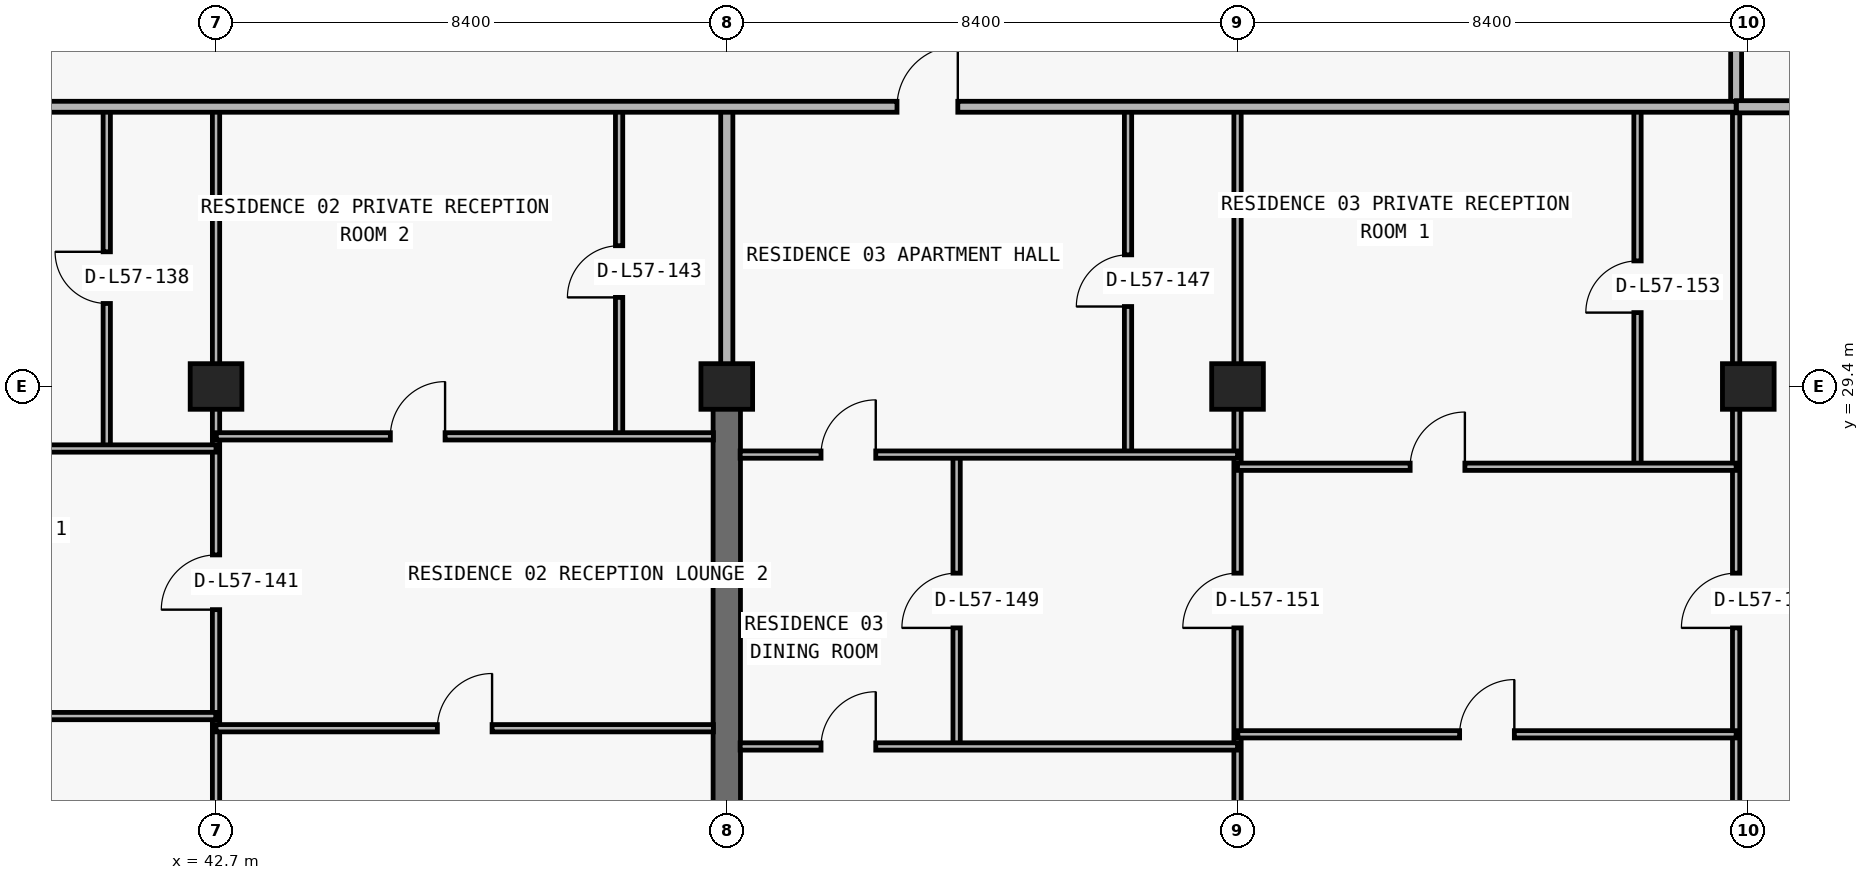
"""IFC4 building model, lengths in metres.
Left out: names, types, materials, properties, quantities, classifications, styles, units other than length and angle.
Written with IfcOpenShell. Run it as: python <this file> out.ifc"""

import sys

from ifc_helpers import new_model, si_unit, direction, frame, frame_2d, origin, origin_2d, place, context, subcontext, project, spatial, rectangle, extrude, element, fill, save


model = new_model("IFC4")
c1 = context("Model", 3, precision=1e-05, world=origin(), true_north=direction((0.0, 1.0)))
c2 = subcontext(c1, "Body", "Model", "MODEL_VIEW")
j1 = project(units=[si_unit("LENGTHUNIT", "METRE"), si_unit("PLANEANGLEUNIT", "RADIAN")], contexts=[c1])
p1 = place(None, origin())
s1 = spatial("IfcSite", under=j1, at=p1, CompositionType="ELEMENT")
p2 = place(p1, origin())
s2 = spatial("IfcBuilding", under=s1, at=p2, CompositionType="ELEMENT")
p3 = place(p2, frame((0.0, 0.0, 204.9)))
s3 = spatial("IfcBuildingStorey", under=s2, at=p3, CompositionType="ELEMENT", Elevation=204.9)
for number, where, z_axis, x_axis in (
    (1, (42.7, 29.4, 0.0), (0.0, 0.0, 1.0), (1.0, 0.0, 0.0)),
    (2, (51.1, 29.4, 0.0), (0.0, 0.0, 1.0), (1.0, 0.0, 0.0)),
    (3, (59.5, 29.4, 0.0), (0.0, 0.0, 1.0), (1.0, 0.0, 0.0)),
    (4, (67.9, 29.4, 0.0), (0.0, 0.0, 1.0), (1.0, 0.0, 0.0)),
):
    element("IfcColumn", number, at=place(p3, frame(where, z_axis=z_axis, x_axis=x_axis)), inside=s3, PredefinedType="COLUMN", context=c2, shape_type="SweptSolid", body=[
        extrude(rectangle(XDim=0.85, YDim=0.75, at=origin_2d()), origin(), (0.0, 0.0, 1.0), 3.05),
    ])
p4 = place(p3, frame((51.1, 20.8, 0.0), z_axis=(0.0, 0.0, 1.0), x_axis=(0.0, 1.0, 0.0)))
e5 = element("IfcWall", 5, at=p4, inside=s3, PredefinedType="SHEAR", context=c2, shape_type="SweptSolid", body=[
    extrude(rectangle(XDim=8.6, YDim=0.45, at=frame_2d((4.3, 0.0))), origin(), (0.0, 0.0, 1.0), 3.05),
])
p5 = place(p3, frame((40.903, 28.38, 0.0), z_axis=(0.0, 0.0, 1.0), x_axis=(0.0, 1.0, 0.0)))
e6 = element("IfcWall", 6, at=p5, inside=s3, PredefinedType="PARTITIONING", context=c2, shape_type="SweptSolid", body=[
    extrude(rectangle(XDim=5.62, YDim=0.12, at=frame_2d((2.81, 0.0))), origin(), (0.0, 0.0, 1.0), 2.725),
])
p6 = place(p5, frame((2.385, 0.0, 0.0)))
e7 = element("IfcOpeningElement", 7, at=p6, cuts=e6, PredefinedType="OPENING", context=c2, shape_type="SweptSolid", body=[
    extrude(rectangle(XDim=0.85, YDim=2.1, at=frame_2d((0.425, 1.05))), frame((0.0, 0.07, 0.0), z_axis=(0.0, -1.0, 0.0), x_axis=(1.0, 0.0, 0.0)), (0.0, 0.0, 1.0), 0.14),
])
p7 = place(p3, frame((42.7, 11.24, 0.0), z_axis=(0.0, 0.0, 1.0), x_axis=(0.0, 1.0, 0.0)))
e8 = element("IfcWall", 8, at=p7, inside=s3, PredefinedType="PARTITIONING", context=c2, shape_type="SweptSolid", body=[
    extrude(rectangle(XDim=22.76, YDim=0.12, at=frame_2d((11.38, 0.0))), origin(), (0.0, 0.0, 1.0), 2.263),
])
p8 = place(p7, frame((14.49, 0.0, 0.0)))
e9 = element("IfcOpeningElement", 9, at=p8, cuts=e8, PredefinedType="OPENING", context=c2, shape_type="SweptSolid", body=[
    extrude(rectangle(XDim=0.9, YDim=2.15, at=frame_2d((0.45, 1.075))), frame((0.0, 0.07, 0.0), z_axis=(0.0, -1.0, 0.0), x_axis=(1.0, 0.0, 0.0)), (0.0, 0.0, 1.0), 0.14),
])
p9 = place(p3, frame((49.329, 28.58, 0.0), z_axis=(0.0, 0.0, 1.0), x_axis=(0.0, 1.0, 0.0)))
e10 = element("IfcWall", 10, at=p9, inside=s3, PredefinedType="PARTITIONING", context=c2, shape_type="SweptSolid", body=[
    extrude(rectangle(XDim=5.42, YDim=0.12, at=frame_2d((2.71, 0.0))), origin(), (0.0, 0.0, 1.0), 3.05),
])
p10 = place(p9, frame((2.285, 0.0, 0.0)))
e11 = element("IfcOpeningElement", 11, at=p10, cuts=e10, PredefinedType="OPENING", context=c2, shape_type="SweptSolid", body=[
    extrude(rectangle(XDim=0.85, YDim=2.1, at=frame_2d((0.425, 1.05))), frame((0.0, 0.07, 0.0), z_axis=(0.0, -1.0, 0.0), x_axis=(1.0, 0.0, 0.0)), (0.0, 0.0, 1.0), 0.14),
])
p11 = place(p3, frame((51.1, 29.405, 0.0), z_axis=(0.0, 0.0, 1.0), x_axis=(0.0, 1.0, 0.0)))
e12 = element("IfcWall", 12, at=p11, inside=s3, PredefinedType="PARTITIONING", context=c2, shape_type="SweptSolid", body=[
    extrude(rectangle(XDim=4.595, YDim=0.2, at=frame_2d((2.297, 0.0))), origin(), (0.0, 0.0, 1.0), 2.335),
])
p12 = place(p3, frame((54.88, 23.48, 0.0), z_axis=(0.0, 0.0, 1.0), x_axis=(0.0, 1.0, 0.0)))
e13 = element("IfcWall", 13, at=p12, inside=s3, PredefinedType="PARTITIONING", context=c2, shape_type="SweptSolid", body=[
    extrude(rectangle(XDim=4.8, YDim=0.12, at=frame_2d((2.4, 0.0))), origin(), (0.0, 0.0, 1.0), 3.05),
])
p13 = place(p12, frame((1.95, 0.0, 0.0)))
e14 = element("IfcOpeningElement", 14, at=p13, cuts=e13, PredefinedType="OPENING", context=c2, shape_type="SweptSolid", body=[
    extrude(rectangle(XDim=0.9, YDim=2.15, at=frame_2d((0.45, 1.075))), frame((0.0, 0.07, 0.0), z_axis=(0.0, -1.0, 0.0), x_axis=(1.0, 0.0, 0.0)), (0.0, 0.0, 1.0), 0.14),
])
p14 = place(p3, frame((57.699, 28.28, 0.0), z_axis=(0.0, 0.0, 1.0), x_axis=(0.0, 1.0, 0.0)))
e15 = element("IfcWall", 15, at=p14, inside=s3, PredefinedType="PARTITIONING", context=c2, shape_type="SweptSolid", body=[
    extrude(rectangle(XDim=5.72, YDim=0.12, at=frame_2d((2.86, 0.0))), origin(), (0.0, 0.0, 1.0), 2.725),
])
p15 = place(p14, frame((2.435, 0.0, 0.0)))
e16 = element("IfcOpeningElement", 16, at=p15, cuts=e15, PredefinedType="OPENING", context=c2, shape_type="SweptSolid", body=[
    extrude(rectangle(XDim=0.85, YDim=2.1, at=frame_2d((0.425, 1.05))), frame((0.0, 0.07, 0.0), z_axis=(0.0, -1.0, 0.0), x_axis=(1.0, 0.0, 0.0)), (0.0, 0.0, 1.0), 0.14),
])
p16 = place(p3, frame((59.5, 11.24, 0.0), z_axis=(0.0, 0.0, 1.0), x_axis=(0.0, 1.0, 0.0)))
e17 = element("IfcWall", 17, at=p16, inside=s3, PredefinedType="PARTITIONING", context=c2, shape_type="SweptSolid", body=[
    extrude(rectangle(XDim=22.76, YDim=0.12, at=frame_2d((11.38, 0.0))), origin(), (0.0, 0.0, 1.0), 2.263),
])
p17 = place(p16, frame((14.19, 0.0, 0.0)))
e18 = element("IfcOpeningElement", 18, at=p17, cuts=e17, PredefinedType="OPENING", context=c2, shape_type="SweptSolid", body=[
    extrude(rectangle(XDim=0.9, YDim=2.15, at=frame_2d((0.45, 1.075))), frame((0.0, 0.07, 0.0), z_axis=(0.0, -1.0, 0.0), x_axis=(1.0, 0.0, 0.0)), (0.0, 0.0, 1.0), 0.14),
])
p18 = place(p3, frame((66.078, 28.08, 0.0), z_axis=(0.0, 0.0, 1.0), x_axis=(0.0, 1.0, 0.0)))
e19 = element("IfcWall", 19, at=p18, inside=s3, PredefinedType="PARTITIONING", context=c2, shape_type="SweptSolid", body=[
    extrude(rectangle(XDim=5.92, YDim=0.12, at=frame_2d((2.96, 0.0))), origin(), (0.0, 0.0, 1.0), 2.725),
])
p19 = place(p18, frame((2.535, 0.0, 0.0)))
e20 = element("IfcOpeningElement", 20, at=p19, cuts=e19, PredefinedType="OPENING", context=c2, shape_type="SweptSolid", body=[
    extrude(rectangle(XDim=0.85, YDim=2.1, at=frame_2d((0.425, 1.05))), frame((0.0, 0.07, 0.0), z_axis=(0.0, -1.0, 0.0), x_axis=(1.0, 0.0, 0.0)), (0.0, 0.0, 1.0), 0.14),
])
p20 = place(p3, frame((67.7, 11.32, 0.0), z_axis=(0.0, 0.0, 1.0), x_axis=(0.0, 1.0, 0.0)))
e21 = element("IfcWall", 21, at=p20, inside=s3, PredefinedType="PARTITIONING", context=c2, shape_type="SweptSolid", body=[
    extrude(rectangle(XDim=22.68, YDim=0.12, at=frame_2d((11.34, 0.0))), origin(), (0.0, 0.0, 1.0), 2.263),
])
p21 = place(p20, frame((14.11, 0.0, 0.0)))
e22 = element("IfcOpeningElement", 22, at=p21, cuts=e21, PredefinedType="OPENING", context=c2, shape_type="SweptSolid", body=[
    extrude(rectangle(XDim=0.9, YDim=2.15, at=frame_2d((0.45, 1.075))), frame((0.0, 0.07, 0.0), z_axis=(0.0, -1.0, 0.0), x_axis=(1.0, 0.0, 0.0)), (0.0, 0.0, 1.0), 0.14),
])
p22 = place(p3, frame((67.7, 34.005, 0.0), z_axis=(0.0, 0.0, 1.0), x_axis=(0.0, 1.0, 0.0)))
e23 = element("IfcWall", 23, at=p22, inside=s3, PredefinedType="PARTITIONING", context=c2, shape_type="SweptSolid", body=[
    extrude(rectangle(XDim=2.995, YDim=0.18, at=frame_2d((1.498, 0.0))), origin(), (0.0, 0.0, 1.0), 2.263),
])
p23 = place(p3, frame((51.32, 23.48, 0.0), z_axis=(0.0, 0.0, 1.0), x_axis=(1.0, 0.0, 0.0)))
e24 = element("IfcWall", 24, at=p23, inside=s3, PredefinedType="PARTITIONING", context=c2, shape_type="SweptSolid", body=[
    extrude(rectangle(XDim=8.18, YDim=0.12, at=frame_2d((4.09, 0.0))), origin(), (0.0, 0.0, 1.0), 3.05),
])
p24 = place(p23, frame((1.33, 0.0, 0.0)))
e25 = element("IfcOpeningElement", 25, at=p24, cuts=e24, PredefinedType="OPENING", context=c2, shape_type="SweptSolid", body=[
    extrude(rectangle(XDim=0.9, YDim=2.15, at=frame_2d((0.45, 1.075))), frame((0.0, 0.07, 0.0), z_axis=(0.0, -1.0, 0.0), x_axis=(1.0, 0.0, 0.0)), (0.0, 0.0, 1.0), 0.14),
])
p25 = place(p3, frame((59.505, 23.68, 0.0), z_axis=(0.0, 0.0, 1.0), x_axis=(1.0, 0.0, 0.0)))
e26 = element("IfcWall", 26, at=p25, inside=s3, PredefinedType="PARTITIONING", context=c2, shape_type="SweptSolid", body=[
    extrude(rectangle(XDim=8.195, YDim=0.12, at=frame_2d((4.098, 0.0))), origin(), (0.0, 0.0, 1.0), 3.05),
])
p26 = place(p25, frame((3.647, 0.0, 0.0)))
e27 = element("IfcOpeningElement", 27, at=p26, cuts=e26, PredefinedType="OPENING", context=c2, shape_type="SweptSolid", body=[
    extrude(rectangle(XDim=0.9, YDim=2.15, at=frame_2d((0.45, 1.075))), frame((0.0, 0.07, 0.0), z_axis=(0.0, -1.0, 0.0), x_axis=(1.0, 0.0, 0.0)), (0.0, 0.0, 1.0), 0.14),
])
p27 = place(p3, frame((42.7, 23.78, 0.0), z_axis=(0.0, 0.0, 1.0), x_axis=(1.0, 0.0, 0.0)))
e28 = element("IfcWall", 28, at=p27, inside=s3, PredefinedType="PARTITIONING", context=c2, shape_type="SweptSolid", body=[
    extrude(rectangle(XDim=8.18, YDim=0.12, at=frame_2d((4.09, 0.0))), origin(), (0.0, 0.0, 1.0), 3.05),
])
p28 = place(p27, frame((3.64, 0.0, 0.0)))
e29 = element("IfcOpeningElement", 29, at=p28, cuts=e28, PredefinedType="OPENING", context=c2, shape_type="SweptSolid", body=[
    extrude(rectangle(XDim=0.9, YDim=2.15, at=frame_2d((0.45, 1.075))), frame((0.0, 0.07, 0.0), z_axis=(0.0, -1.0, 0.0), x_axis=(1.0, 0.0, 0.0)), (0.0, 0.0, 1.0), 0.14),
])
p29 = place(p3, frame((35.105, 23.98, 0.0), z_axis=(0.0, 0.0, 1.0), x_axis=(1.0, 0.0, 0.0)))
e30 = element("IfcWall", 30, at=p29, inside=s3, PredefinedType="PARTITIONING", context=c2, shape_type="SweptSolid", body=[
    extrude(rectangle(XDim=7.59, YDim=0.12, at=frame_2d((3.795, 0.0))), origin(), (0.0, 0.0, 1.0), 3.05),
])
p30 = place(p29, frame((3.345, 0.0, 0.0)))
e31 = element("IfcOpeningElement", 31, at=p30, cuts=e30, PredefinedType="OPENING", context=c2, shape_type="SweptSolid", body=[
    extrude(rectangle(XDim=0.9, YDim=2.15, at=frame_2d((0.45, 1.075))), frame((0.0, 0.07, 0.0), z_axis=(0.0, -1.0, 0.0), x_axis=(1.0, 0.0, 0.0)), (0.0, 0.0, 1.0), 0.14),
])
p31 = place(p3, frame((59.5, 28.08, 0.0), z_axis=(0.0, 0.0, 1.0), x_axis=(1.0, 0.0, 0.0)))
e32 = element("IfcWall", 32, at=p31, inside=s3, PredefinedType="PARTITIONING", context=c2, shape_type="SweptSolid", body=[
    extrude(rectangle(XDim=8.2, YDim=0.12, at=frame_2d((4.1, 0.0))), origin(), (0.0, 0.0, 1.0), 3.05),
])
p32 = place(p31, frame((2.839, 0.0, 0.0)))
e33 = element("IfcOpeningElement", 33, at=p32, cuts=e32, PredefinedType="OPENING", context=c2, shape_type="SweptSolid", body=[
    extrude(rectangle(XDim=0.9, YDim=2.15, at=frame_2d((0.45, 1.075))), frame((0.0, 0.07, 0.0), z_axis=(0.0, -1.0, 0.0), x_axis=(1.0, 0.0, 0.0)), (0.0, 0.0, 1.0), 0.14),
])
p33 = place(p3, frame((51.32, 28.28, 0.0), z_axis=(0.0, 0.0, 1.0), x_axis=(1.0, 0.0, 0.0)))
e34 = element("IfcWall", 34, at=p33, inside=s3, PredefinedType="PARTITIONING", context=c2, shape_type="SweptSolid", body=[
    extrude(rectangle(XDim=8.18, YDim=0.12, at=frame_2d((4.09, 0.0))), origin(), (0.0, 0.0, 1.0), 3.05),
])
p34 = place(p33, frame((1.33, 0.0, 0.0)))
e35 = element("IfcOpeningElement", 35, at=p34, cuts=e34, PredefinedType="OPENING", context=c2, shape_type="SweptSolid", body=[
    extrude(rectangle(XDim=0.9, YDim=2.15, at=frame_2d((0.45, 1.075))), frame((0.0, 0.07, 0.0), z_axis=(0.0, -1.0, 0.0), x_axis=(1.0, 0.0, 0.0)), (0.0, 0.0, 1.0), 0.14),
])
p35 = place(p3, frame((35.1, 28.38, 0.0), z_axis=(0.0, 0.0, 1.0), x_axis=(1.0, 0.0, 0.0)))
e36 = element("IfcWall", 36, at=p35, inside=s3, PredefinedType="PARTITIONING", context=c2, shape_type="SweptSolid", body=[
    extrude(rectangle(XDim=7.6, YDim=0.12, at=frame_2d((3.8, 0.0))), origin(), (0.0, 0.0, 1.0), 3.05),
])
p36 = place(p35, frame((2.451, 0.0, 0.0)))
e37 = element("IfcOpeningElement", 37, at=p36, cuts=e36, PredefinedType="OPENING", context=c2, shape_type="SweptSolid", body=[
    extrude(rectangle(XDim=0.9, YDim=2.15, at=frame_2d((0.45, 1.075))), frame((0.0, 0.07, 0.0), z_axis=(0.0, -1.0, 0.0), x_axis=(1.0, 0.0, 0.0)), (0.0, 0.0, 1.0), 0.14),
])
p37 = place(p3, frame((42.705, 28.58, 0.0), z_axis=(0.0, 0.0, 1.0), x_axis=(1.0, 0.0, 0.0)))
e38 = element("IfcWall", 38, at=p37, inside=s3, PredefinedType="PARTITIONING", context=c2, shape_type="SweptSolid", body=[
    extrude(rectangle(XDim=8.175, YDim=0.12, at=frame_2d((4.087, 0.0))), origin(), (0.0, 0.0, 1.0), 3.05),
])
p38 = place(p37, frame((2.862, 0.0, 0.0)))
e39 = element("IfcOpeningElement", 39, at=p38, cuts=e38, PredefinedType="OPENING", context=c2, shape_type="SweptSolid", body=[
    extrude(rectangle(XDim=0.9, YDim=2.15, at=frame_2d((0.45, 1.075))), frame((0.0, 0.07, 0.0), z_axis=(0.0, -1.0, 0.0), x_axis=(1.0, 0.0, 0.0)), (0.0, 0.0, 1.0), 0.14),
])
p39 = place(p3, frame((10.105, 34.0, 0.0), z_axis=(0.0, 0.0, 1.0), x_axis=(1.0, 0.0, 0.0)))
e40 = element("IfcWall", 40, at=p39, inside=s3, PredefinedType="PARTITIONING", context=c2, shape_type="SweptSolid", body=[
    extrude(rectangle(XDim=57.595, YDim=0.18, at=frame_2d((28.797, 0.0))), origin(), (0.0, 0.0, 1.0), 3.05),
])
p40 = place(p39, frame((2.712, 0.0, 0.0)))
e41 = element("IfcOpeningElement", 41, at=p40, cuts=e40, PredefinedType="OPENING", context=c2, shape_type="SweptSolid", body=[
    extrude(rectangle(XDim=1.0, YDim=2.2, at=frame_2d((0.5, 1.1))), frame((0.0, 0.1, 0.0), z_axis=(0.0, -1.0, 0.0), x_axis=(1.0, 0.0, 0.0)), (0.0, 0.0, 1.0), 0.2),
])
p41 = place(p39, frame((19.391, 0.0, 0.0)))
e42 = element("IfcOpeningElement", 42, at=p41, cuts=e40, PredefinedType="OPENING", context=c2, shape_type="SweptSolid", body=[
    extrude(rectangle(XDim=1.0, YDim=2.2, at=frame_2d((0.5, 1.1))), frame((0.0, 0.1, 0.0), z_axis=(0.0, -1.0, 0.0), x_axis=(1.0, 0.0, 0.0)), (0.0, 0.0, 1.0), 0.2),
])
p42 = place(p39, frame((43.794, 0.0, 0.0)))
e43 = element("IfcOpeningElement", 43, at=p42, cuts=e40, PredefinedType="OPENING", context=c2, shape_type="SweptSolid", body=[
    extrude(rectangle(XDim=1.0, YDim=2.2, at=frame_2d((0.5, 1.1))), frame((0.0, 0.1, 0.0), z_axis=(0.0, -1.0, 0.0), x_axis=(1.0, 0.0, 0.0)), (0.0, 0.0, 1.0), 0.2),
])
p43 = place(p3, frame((67.705, 34.0, 0.0), z_axis=(0.0, 0.0, 1.0), x_axis=(1.0, 0.0, 0.0)))
e44 = element("IfcWall", 44, at=p43, inside=s3, PredefinedType="PARTITIONING", context=c2, shape_type="SweptSolid", body=[
    extrude(rectangle(XDim=3.7, YDim=0.2, at=frame_2d((1.85, 0.0))), origin(), (0.0, 0.0, 1.0), 3.05),
])
p44 = place(p6, origin())
e45 = element("IfcDoor", 45, at=p44, inside=s3, OperationType="SINGLE_SWING_RIGHT", PredefinedType="DOOR", context=c2, shape_type="SweptSolid", body=[
    extrude(rectangle(XDim=0.85, YDim=2.1, at=frame_2d((0.425, 1.05))), frame((0.0, 0.025, 0.0), z_axis=(0.0, -1.0, 0.0), x_axis=(1.0, 0.0, 0.0)), (0.0, 0.0, 1.0), 0.05),
])
fill(e7, e45)
p45 = place(p8, origin())
e46 = element("IfcDoor", 46, at=p45, inside=s3, OperationType="SINGLE_SWING_LEFT", PredefinedType="DOOR", context=c2, shape_type="SweptSolid", body=[
    extrude(rectangle(XDim=0.9, YDim=2.15, at=frame_2d((0.45, 1.075))), frame((0.0, 0.025, 0.0), z_axis=(0.0, -1.0, 0.0), x_axis=(1.0, 0.0, 0.0)), (0.0, 0.0, 1.0), 0.05),
])
fill(e9, e46)
p46 = place(p38, origin())
e47 = element("IfcDoor", 47, at=p46, inside=s3, OperationType="SINGLE_SWING_RIGHT", PredefinedType="DOOR", context=c2, shape_type="SweptSolid", body=[
    extrude(rectangle(XDim=0.9, YDim=2.15, at=frame_2d((0.45, 1.075))), frame((0.0, 0.025, 0.0), z_axis=(0.0, -1.0, 0.0), x_axis=(1.0, 0.0, 0.0)), (0.0, 0.0, 1.0), 0.05),
])
fill(e39, e47)
p47 = place(p10, origin())
e48 = element("IfcDoor", 48, at=p47, inside=s3, OperationType="SINGLE_SWING_LEFT", PredefinedType="DOOR", context=c2, shape_type="SweptSolid", body=[
    extrude(rectangle(XDim=0.85, YDim=2.1, at=frame_2d((0.425, 1.05))), frame((0.0, 0.025, 0.0), z_axis=(0.0, -1.0, 0.0), x_axis=(1.0, 0.0, 0.0)), (0.0, 0.0, 1.0), 0.05),
])
fill(e11, e48)
p48 = place(p28, origin())
e49 = element("IfcDoor", 49, at=p48, inside=s3, OperationType="SINGLE_SWING_RIGHT", PredefinedType="DOOR", context=c2, shape_type="SweptSolid", body=[
    extrude(rectangle(XDim=0.9, YDim=2.15, at=frame_2d((0.45, 1.075))), frame((0.0, 0.025, 0.0), z_axis=(0.0, -1.0, 0.0), x_axis=(1.0, 0.0, 0.0)), (0.0, 0.0, 1.0), 0.05),
])
fill(e29, e49)
p49 = place(p42, origin())
e50 = element("IfcDoor", 50, at=p49, inside=s3, OperationType="SINGLE_SWING_RIGHT", PredefinedType="DOOR", context=c2, shape_type="SweptSolid", body=[
    extrude(rectangle(XDim=1.0, YDim=2.2, at=frame_2d((0.5, 1.1))), frame((0.0, 0.025, 0.0), z_axis=(0.0, -1.0, 0.0), x_axis=(1.0, 0.0, 0.0)), (0.0, 0.0, 1.0), 0.05),
])
fill(e43, e50)
p50 = place(p15, origin())
e51 = element("IfcDoor", 51, at=p50, inside=s3, OperationType="SINGLE_SWING_LEFT", PredefinedType="DOOR", context=c2, shape_type="SweptSolid", body=[
    extrude(rectangle(XDim=0.85, YDim=2.1, at=frame_2d((0.425, 1.05))), frame((0.0, 0.025, 0.0), z_axis=(0.0, -1.0, 0.0), x_axis=(1.0, 0.0, 0.0)), (0.0, 0.0, 1.0), 0.05),
])
fill(e16, e51)
p51 = place(p34, origin())
e52 = element("IfcDoor", 52, at=p51, inside=s3, OperationType="SINGLE_SWING_RIGHT", PredefinedType="DOOR", context=c2, shape_type="SweptSolid", body=[
    extrude(rectangle(XDim=0.9, YDim=2.15, at=frame_2d((0.45, 1.075))), frame((0.0, 0.025, 0.0), z_axis=(0.0, -1.0, 0.0), x_axis=(1.0, 0.0, 0.0)), (0.0, 0.0, 1.0), 0.05),
])
fill(e35, e52)
p52 = place(p13, origin())
e53 = element("IfcDoor", 53, at=p52, inside=s3, OperationType="SINGLE_SWING_LEFT", PredefinedType="DOOR", context=c2, shape_type="SweptSolid", body=[
    extrude(rectangle(XDim=0.9, YDim=2.15, at=frame_2d((0.45, 1.075))), frame((0.0, 0.025, 0.0), z_axis=(0.0, -1.0, 0.0), x_axis=(1.0, 0.0, 0.0)), (0.0, 0.0, 1.0), 0.05),
])
fill(e14, e53)
p53 = place(p24, origin())
e54 = element("IfcDoor", 54, at=p53, inside=s3, OperationType="SINGLE_SWING_RIGHT", PredefinedType="DOOR", context=c2, shape_type="SweptSolid", body=[
    extrude(rectangle(XDim=0.9, YDim=2.15, at=frame_2d((0.45, 1.075))), frame((0.0, 0.025, 0.0), z_axis=(0.0, -1.0, 0.0), x_axis=(1.0, 0.0, 0.0)), (0.0, 0.0, 1.0), 0.05),
])
fill(e25, e54)
p54 = place(p17, origin())
e55 = element("IfcDoor", 55, at=p54, inside=s3, OperationType="SINGLE_SWING_LEFT", PredefinedType="DOOR", context=c2, shape_type="SweptSolid", body=[
    extrude(rectangle(XDim=0.9, YDim=2.15, at=frame_2d((0.45, 1.075))), frame((0.0, 0.025, 0.0), z_axis=(0.0, -1.0, 0.0), x_axis=(1.0, 0.0, 0.0)), (0.0, 0.0, 1.0), 0.05),
])
fill(e18, e55)
p55 = place(p32, origin())
e56 = element("IfcDoor", 56, at=p55, inside=s3, OperationType="SINGLE_SWING_RIGHT", PredefinedType="DOOR", context=c2, shape_type="SweptSolid", body=[
    extrude(rectangle(XDim=0.9, YDim=2.15, at=frame_2d((0.45, 1.075))), frame((0.0, 0.025, 0.0), z_axis=(0.0, -1.0, 0.0), x_axis=(1.0, 0.0, 0.0)), (0.0, 0.0, 1.0), 0.05),
])
fill(e33, e56)
p56 = place(p19, origin())
e57 = element("IfcDoor", 57, at=p56, inside=s3, OperationType="SINGLE_SWING_LEFT", PredefinedType="DOOR", context=c2, shape_type="SweptSolid", body=[
    extrude(rectangle(XDim=0.85, YDim=2.1, at=frame_2d((0.425, 1.05))), frame((0.0, 0.025, 0.0), z_axis=(0.0, -1.0, 0.0), x_axis=(1.0, 0.0, 0.0)), (0.0, 0.0, 1.0), 0.05),
])
fill(e20, e57)
p57 = place(p26, origin())
e58 = element("IfcDoor", 58, at=p57, inside=s3, OperationType="SINGLE_SWING_RIGHT", PredefinedType="DOOR", context=c2, shape_type="SweptSolid", body=[
    extrude(rectangle(XDim=0.9, YDim=2.15, at=frame_2d((0.45, 1.075))), frame((0.0, 0.025, 0.0), z_axis=(0.0, -1.0, 0.0), x_axis=(1.0, 0.0, 0.0)), (0.0, 0.0, 1.0), 0.05),
])
fill(e27, e58)
p58 = place(p21, origin())
e59 = element("IfcDoor", 59, at=p58, inside=s3, OperationType="SINGLE_SWING_LEFT", PredefinedType="DOOR", context=c2, shape_type="SweptSolid", body=[
    extrude(rectangle(XDim=0.9, YDim=2.15, at=frame_2d((0.45, 1.075))), frame((0.0, 0.025, 0.0), z_axis=(0.0, -1.0, 0.0), x_axis=(1.0, 0.0, 0.0)), (0.0, 0.0, 1.0), 0.05),
])
fill(e22, e59)
save(model, sys.argv[1])
